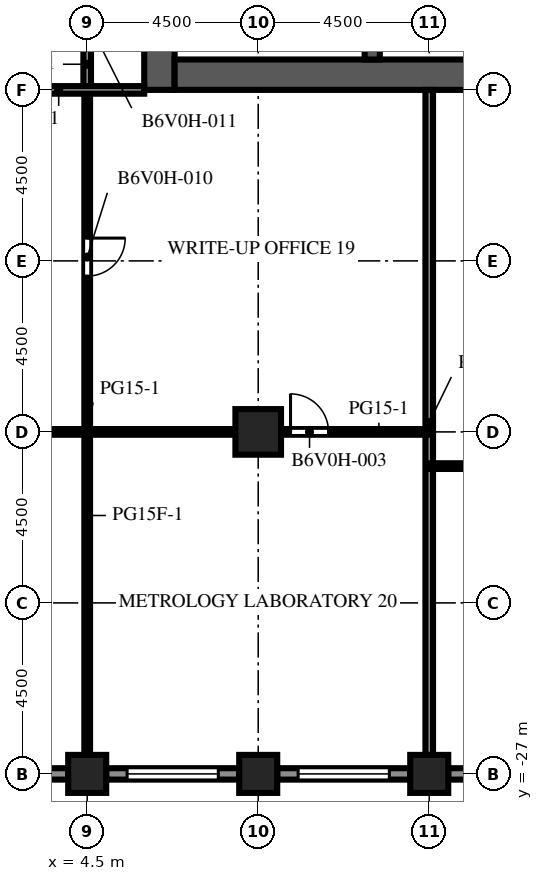
"""IFC4 building model, lengths in metres.
Left out: names, types, materials, properties, quantities, classifications, styles, units other than length and angle.
Written with IfcOpenShell. Run it as: python <this file> out.ifc"""

import sys

from ifc_helpers import new_model, si_unit, direction, frame, frame_2d, origin, origin_2d, place, context, subcontext, project, spatial, rectangle, extrude, element, fill, save


model = new_model("IFC4")
c1 = context("Model", 3, precision=1e-05, world=origin(), true_north=direction((0.0, 1.0)))
c2 = subcontext(c1, "Body", "Model", "MODEL_VIEW")
j1 = project(units=[si_unit("LENGTHUNIT", "METRE"), si_unit("PLANEANGLEUNIT", "RADIAN")], contexts=[c1])
p1 = place(None, origin())
s1 = spatial("IfcSite", under=j1, at=p1, CompositionType="ELEMENT")
p2 = place(p1, origin())
s2 = spatial("IfcBuilding", under=s1, at=p2, CompositionType="ELEMENT")
p3 = place(p2, frame((0.0, 0.0, 191.5)))
s3 = spatial("IfcBuildingStorey", under=s2, at=p3, CompositionType="ELEMENT", Elevation=191.5)
for number, where, z_axis, x_axis in (
    (1, (4.5, -27.0, 0.0), (0.0, 0.0, 1.0), (1.0, 0.0, 0.0)),
    (2, (9.0, -27.0, 0.0), (0.0, 0.0, 1.0), (1.0, 0.0, 0.0)),
    (3, (13.5, -27.0, 0.0), (0.0, 0.0, 1.0), (1.0, 0.0, 0.0)),
):
    element("IfcColumn", number, at=place(p3, frame(where, z_axis=z_axis, x_axis=x_axis)), inside=s3, PredefinedType="COLUMN", context=c2, shape_type="SweptSolid", body=[
        extrude(rectangle(XDim=1.0, YDim=1.0, at=origin_2d()), origin(), (0.0, 0.0, 1.0), 4.1),
    ])
p4 = place(p3, frame((9.0, -18.0, 0.0), z_axis=(0.0, 0.0, 1.0), x_axis=(1.0, 0.0, 0.0)))
e4 = element("IfcColumn", 4, at=p4, inside=s3, PredefinedType="COLUMN", context=c2, shape_type="SweptSolid", body=[
    extrude(rectangle(XDim=1.2, YDim=1.2, at=origin_2d()), origin(), (0.0, 0.0, 1.0), 4.1),
])
p5 = place(p3, frame((6.4, -9.0, 0.0), z_axis=(0.0, 0.0, 1.0), x_axis=(0.0, 1.0, 0.0)))
e5 = element("IfcWall", 5, at=p5, inside=s3, PredefinedType="SHEAR", context=c2, shape_type="SweptSolid", body=[
    extrude(rectangle(XDim=27.5, YDim=0.8, at=frame_2d((13.75, 0.0))), origin(), (0.0, 0.0, 1.0), 4.1),
])
p6 = place(p5, frame((12.55, 0.0, 0.0)))
e6 = element("IfcOpeningElement", 6, at=p6, cuts=e5, PredefinedType="OPENING", context=c2, shape_type="SweptSolid", body=[
    extrude(rectangle(XDim=2.4, YDim=2.4, at=frame_2d((1.2, 1.2))), frame((0.0, 0.41, 0.0), z_axis=(0.0, -1.0, 0.0), x_axis=(1.0, 0.0, 0.0)), (0.0, 0.0, 1.0), 0.82),
])
p7 = place(p5, frame((3.95, 0.0, 0.0)))
e7 = element("IfcOpeningElement", 7, at=p7, cuts=e5, PredefinedType="OPENING", context=c2, shape_type="SweptSolid", body=[
    extrude(rectangle(XDim=1.2, YDim=2.1, at=frame_2d((0.6, 1.05))), frame((0.0, 0.41, 0.0), z_axis=(0.0, -1.0, 0.0), x_axis=(1.0, 0.0, 0.0)), (0.0, 0.0, 1.0), 0.82),
])
p8 = place(p5, frame((19.45, 0.0, 0.0)))
e8 = element("IfcOpeningElement", 8, at=p8, cuts=e5, PredefinedType="OPENING", context=c2, shape_type="SweptSolid", body=[
    extrude(rectangle(XDim=1.0, YDim=2.1, at=frame_2d((0.5, 1.05))), frame((0.0, 0.41, 0.0), z_axis=(0.0, -1.0, 0.0), x_axis=(1.0, 0.0, 0.0)), (0.0, 0.0, 1.0), 0.82),
])
p9 = place(p5, frame((21.137, 0.0, 0.0)))
e9 = element("IfcOpeningElement", 9, at=p9, cuts=e5, PredefinedType="OPENING", context=c2, shape_type="SweptSolid", body=[
    extrude(rectangle(XDim=1.0, YDim=2.1, at=frame_2d((0.5, 1.05))), frame((0.0, 0.41, 0.0), z_axis=(0.0, -1.0, 0.0), x_axis=(1.0, 0.0, 0.0)), (0.0, 0.0, 1.0), 0.82),
])
p10 = place(p5, frame((23.2, 0.0, 0.0)))
e10 = element("IfcOpeningElement", 10, at=p10, cuts=e5, PredefinedType="OPENING", context=c2, shape_type="SweptSolid", body=[
    extrude(rectangle(XDim=1.0, YDim=2.1, at=frame_2d((0.5, 1.05))), frame((0.0, 0.41, 0.0), z_axis=(0.0, -1.0, 0.0), x_axis=(1.0, 0.0, 0.0)), (0.0, 0.0, 1.0), 0.82),
])
p11 = place(p5, frame((25.262, 0.0, 0.0)))
e11 = element("IfcOpeningElement", 11, at=p11, cuts=e5, PredefinedType="OPENING", context=c2, shape_type="SweptSolid", body=[
    extrude(rectangle(XDim=1.0, YDim=2.1, at=frame_2d((0.5, 1.05))), frame((0.0, 0.41, 0.0), z_axis=(0.0, -1.0, 0.0), x_axis=(1.0, 0.0, 0.0)), (0.0, 0.0, 1.0), 0.82),
])
p12 = place(p3, frame((6.8, -8.6, 0.0), z_axis=(0.0, 0.0, 1.0), x_axis=(1.0, 0.0, 0.0)))
e12 = element("IfcWall", 12, at=p12, inside=s3, PredefinedType="SHEAR", context=c2, shape_type="SweptSolid", body=[
    extrude(rectangle(XDim=10.4, YDim=0.8, at=frame_2d((5.2, 0.0))), origin(), (0.0, 0.0, 1.0), 4.1),
])
p13 = place(p3, frame((12.0, -8.2, 0.0), z_axis=(0.0, 0.0, 1.0), x_axis=(0.0, 1.0, 0.0)))
e13 = element("IfcWall", 13, at=p13, inside=s3, PredefinedType="SHEAR", context=c2, shape_type="SweptSolid", body=[
    extrude(rectangle(XDim=7.5, YDim=0.4, at=frame_2d((3.75, 0.0))), origin(), (0.0, 0.0, 1.0), 4.1),
])
p14 = place(p3, frame((4.0, -27.0, 0.0), z_axis=(0.0, 0.0, 1.0), x_axis=(-1.0, 0.0, 0.0)))
e14 = element("IfcWall", 14, at=p14, inside=s3, PredefinedType="SOLIDWALL", context=c2, shape_type="SweptSolid", body=[
    extrude(rectangle(XDim=3.5, YDim=0.3, at=frame_2d((1.75, 0.0))), origin(), (0.0, 0.0, 1.0), 2.85),
])
p15 = place(p14, frame((0.55, 0.0, 0.8)))
e15 = element("IfcOpeningElement", 15, at=p15, cuts=e14, PredefinedType="OPENING", context=c2, shape_type="SweptSolid", body=[
    extrude(rectangle(XDim=2.4, YDim=1.7, at=frame_2d((1.2, 0.85))), frame((0.0, 0.16, 0.0), z_axis=(0.0, -1.0, 0.0), x_axis=(1.0, 0.0, 0.0)), (0.0, 0.0, 1.0), 0.32),
])
p16 = place(p3, frame((8.5, -27.0, 0.0), z_axis=(0.0, 0.0, 1.0), x_axis=(-1.0, 0.0, 0.0)))
e16 = element("IfcWall", 16, at=p16, inside=s3, PredefinedType="SOLIDWALL", context=c2, shape_type="SweptSolid", body=[
    extrude(rectangle(XDim=3.5, YDim=0.3, at=frame_2d((1.75, 0.0))), origin(), (0.0, 0.0, 1.0), 2.85),
])
p17 = place(p16, frame((0.55, 0.0, 0.8)))
e17 = element("IfcOpeningElement", 17, at=p17, cuts=e16, PredefinedType="OPENING", context=c2, shape_type="SweptSolid", body=[
    extrude(rectangle(XDim=2.4, YDim=1.7, at=frame_2d((1.2, 0.85))), frame((0.0, 0.16, 0.0), z_axis=(0.0, -1.0, 0.0), x_axis=(1.0, 0.0, 0.0)), (0.0, 0.0, 1.0), 0.32),
])
p18 = place(p3, frame((13.0, -27.0, 0.0), z_axis=(0.0, 0.0, 1.0), x_axis=(-1.0, 0.0, 0.0)))
e18 = element("IfcWall", 18, at=p18, inside=s3, PredefinedType="SOLIDWALL", context=c2, shape_type="SweptSolid", body=[
    extrude(rectangle(XDim=3.5, YDim=0.3, at=frame_2d((1.75, 0.0))), origin(), (0.0, 0.0, 1.0), 2.85),
])
p19 = place(p18, frame((0.55, 0.0, 0.8)))
e19 = element("IfcOpeningElement", 19, at=p19, cuts=e18, PredefinedType="OPENING", context=c2, shape_type="SweptSolid", body=[
    extrude(rectangle(XDim=2.4, YDim=1.7, at=frame_2d((1.2, 0.85))), frame((0.0, 0.16, 0.0), z_axis=(0.0, -1.0, 0.0), x_axis=(1.0, 0.0, 0.0)), (0.0, 0.0, 1.0), 0.32),
])
p20 = place(p3, frame((17.5, -27.0, 0.0), z_axis=(0.0, 0.0, 1.0), x_axis=(-1.0, 0.0, 0.0)))
e20 = element("IfcWall", 20, at=p20, inside=s3, PredefinedType="SOLIDWALL", context=c2, shape_type="SweptSolid", body=[
    extrude(rectangle(XDim=3.5, YDim=0.3, at=frame_2d((1.75, 0.0))), origin(), (0.0, 0.0, 1.0), 2.85),
])
p21 = place(p20, frame((0.55, 0.0, 0.8)))
e21 = element("IfcOpeningElement", 21, at=p21, cuts=e20, PredefinedType="OPENING", context=c2, shape_type="SweptSolid", body=[
    extrude(rectangle(XDim=2.4, YDim=1.7, at=frame_2d((1.2, 0.85))), frame((0.0, 0.16, 0.0), z_axis=(0.0, -1.0, 0.0), x_axis=(1.0, 0.0, 0.0)), (0.0, 0.0, 1.0), 0.32),
])
p22 = place(p3, frame((4.5, -9.0, 0.0), z_axis=(0.0, 0.0, 1.0), x_axis=(0.0, -1.0, 0.0)))
e22 = element("IfcWall", 22, at=p22, inside=s3, PredefinedType="PARTITIONING", context=c2, shape_type="SweptSolid", body=[
    extrude(rectangle(XDim=17.5, YDim=0.15, at=frame_2d((8.75, 0.0))), origin(), (0.0, 0.0, 1.0), 3.65),
])
p23 = place(p22, frame((3.9, 0.0, 0.0)))
e23 = element("IfcOpeningElement", 23, at=p23, cuts=e22, PredefinedType="OPENING", context=c2, shape_type="SweptSolid", body=[
    extrude(rectangle(XDim=1.0, YDim=2.1, at=frame_2d((0.5, 1.05))), frame((0.0, 0.085, 0.0), z_axis=(0.0, -1.0, 0.0), x_axis=(1.0, 0.0, 0.0)), (0.0, 0.0, 1.0), 0.17),
])
p24 = place(p3, frame((4.5, -6.0, 0.0), z_axis=(0.0, 0.0, 1.0), x_axis=(0.0, -1.0, 0.0)))
e24 = element("IfcWall", 24, at=p24, inside=s3, PredefinedType="PARTITIONING", context=c2, shape_type="SweptSolid", body=[
    extrude(rectangle(XDim=3.0, YDim=0.2, at=frame_2d((1.5, 0.0))), origin(), (0.0, 0.0, 1.0), 3.65),
])
p25 = place(p24, frame((0.65, 0.0, 0.0)))
e25 = element("IfcOpeningElement", 25, at=p25, cuts=e24, PredefinedType="OPENING", context=c2, shape_type="SweptSolid", body=[
    extrude(rectangle(XDim=1.0, YDim=2.1, at=frame_2d((0.5, 1.05))), frame((0.0, 0.11, 0.0), z_axis=(0.0, -1.0, 0.0), x_axis=(1.0, 0.0, 0.0)), (0.0, 0.0, 1.0), 0.22),
])
p26 = place(p3, frame((13.5, -26.5, 0.0), z_axis=(0.0, 0.0, 1.0), x_axis=(0.0, 1.0, 0.0)))
e26 = element("IfcWall", 26, at=p26, inside=s3, PredefinedType="PARTITIONING", context=c2, shape_type="SweptSolid", body=[
    extrude(rectangle(XDim=17.5, YDim=0.2, at=frame_2d((8.75, 0.0))), origin(), (0.0, 0.0, 1.0), 3.65),
])
p27 = place(p3, frame((21.0, -18.9, 0.0), z_axis=(0.0, 0.0, 1.0), x_axis=(-1.0, 0.0, 0.0)))
e27 = element("IfcWall", 27, at=p27, inside=s3, PredefinedType="PARTITIONING", context=c2, shape_type="SweptSolid", body=[
    extrude(rectangle(XDim=7.5, YDim=0.15, at=frame_2d((3.75, 0.0))), origin(), (0.0, 0.0, 1.0), 3.65),
])
p28 = place(p27, frame((3.65, 0.0, 0.0)))
e28 = element("IfcOpeningElement", 28, at=p28, cuts=e27, PredefinedType="OPENING", context=c2, shape_type="SweptSolid", body=[
    extrude(rectangle(XDim=1.0, YDim=2.1, at=frame_2d((0.5, 1.05))), frame((0.0, 0.085, 0.0), z_axis=(0.0, -1.0, 0.0), x_axis=(1.0, 0.0, 0.0)), (0.0, 0.0, 1.0), 0.17),
])
p29 = place(p3, frame((0.6, -18.0, 0.0), z_axis=(0.0, 0.0, 1.0), x_axis=(1.0, 0.0, 0.0)))
e29 = element("IfcWall", 29, at=p29, inside=s3, PredefinedType="PARTITIONING", context=c2, shape_type="SweptSolid", body=[
    extrude(rectangle(XDim=7.8, YDim=0.15, at=frame_2d((3.9, 0.0))), origin(), (0.0, 0.0, 1.0), 3.65),
])
p30 = place(p3, frame((13.5, -18.0, 0.0), z_axis=(0.0, 0.0, 1.0), x_axis=(-1.0, 0.0, 0.0)))
e30 = element("IfcWall", 30, at=p30, inside=s3, PredefinedType="PARTITIONING", context=c2, shape_type="SweptSolid", body=[
    extrude(rectangle(XDim=3.9, YDim=0.15, at=frame_2d((1.95, 0.0))), origin(), (0.0, 0.0, 1.0), 3.65),
])
p31 = place(p30, frame((2.65, 0.0, 0.0)))
e31 = element("IfcOpeningElement", 31, at=p31, cuts=e30, PredefinedType="OPENING", context=c2, shape_type="SweptSolid", body=[
    extrude(rectangle(XDim=1.0, YDim=2.1, at=frame_2d((0.5, 1.05))), frame((0.0, 0.085, 0.0), z_axis=(0.0, -1.0, 0.0), x_axis=(1.0, 0.0, 0.0)), (0.0, 0.0, 1.0), 0.17),
])
p32 = place(p3, frame((1.5, -9.0, 0.0), z_axis=(0.0, 0.0, 1.0), x_axis=(1.0, 0.0, 0.0)))
e32 = element("IfcWall", 32, at=p32, inside=s3, PredefinedType="PARTITIONING", context=c2, shape_type="SweptSolid", body=[
    extrude(rectangle(XDim=4.5, YDim=0.2, at=frame_2d((2.25, 0.0))), origin(), (0.0, 0.0, 1.0), 3.65),
])
p33 = place(p17, origin())
e33 = element("IfcWindow", 33, at=p33, inside=s3, PartitioningType="SINGLE_PANEL", PredefinedType="WINDOW", context=c2, shape_type="SweptSolid", body=[
    extrude(rectangle(XDim=2.4, YDim=1.7, at=frame_2d((1.2, 0.85))), frame((0.0, 0.03, 0.0), z_axis=(0.0, -1.0, 0.0), x_axis=(1.0, 0.0, 0.0)), (0.0, 0.0, 1.0), 0.06),
])
fill(e17, e33)
p34 = place(p19, origin())
e34 = element("IfcWindow", 34, at=p34, inside=s3, PartitioningType="SINGLE_PANEL", PredefinedType="WINDOW", context=c2, shape_type="SweptSolid", body=[
    extrude(rectangle(XDim=2.4, YDim=1.7, at=frame_2d((1.2, 0.85))), frame((0.0, 0.03, 0.0), z_axis=(0.0, -1.0, 0.0), x_axis=(1.0, 0.0, 0.0)), (0.0, 0.0, 1.0), 0.06),
])
fill(e19, e34)
p35 = place(p31, origin())
e35 = element("IfcDoor", 35, at=p35, inside=s3, OperationType="SINGLE_SWING_RIGHT", PredefinedType="DOOR", context=c2, shape_type="SweptSolid", body=[
    extrude(rectangle(XDim=1.0, YDim=2.1, at=frame_2d((0.5, 1.05))), frame((0.0, 0.025, 0.0), z_axis=(0.0, -1.0, 0.0), x_axis=(1.0, 0.0, 0.0)), (0.0, 0.0, 1.0), 0.05),
])
fill(e31, e35)
p36 = place(p23, origin())
e36 = element("IfcDoor", 36, at=p36, inside=s3, OperationType="SINGLE_SWING_LEFT", PredefinedType="DOOR", context=c2, shape_type="SweptSolid", body=[
    extrude(rectangle(XDim=1.0, YDim=2.1, at=frame_2d((0.5, 1.05))), frame((0.0, 0.025, 0.0), z_axis=(0.0, -1.0, 0.0), x_axis=(1.0, 0.0, 0.0)), (0.0, 0.0, 1.0), 0.05),
])
fill(e23, e36)
save(model, sys.argv[1])
